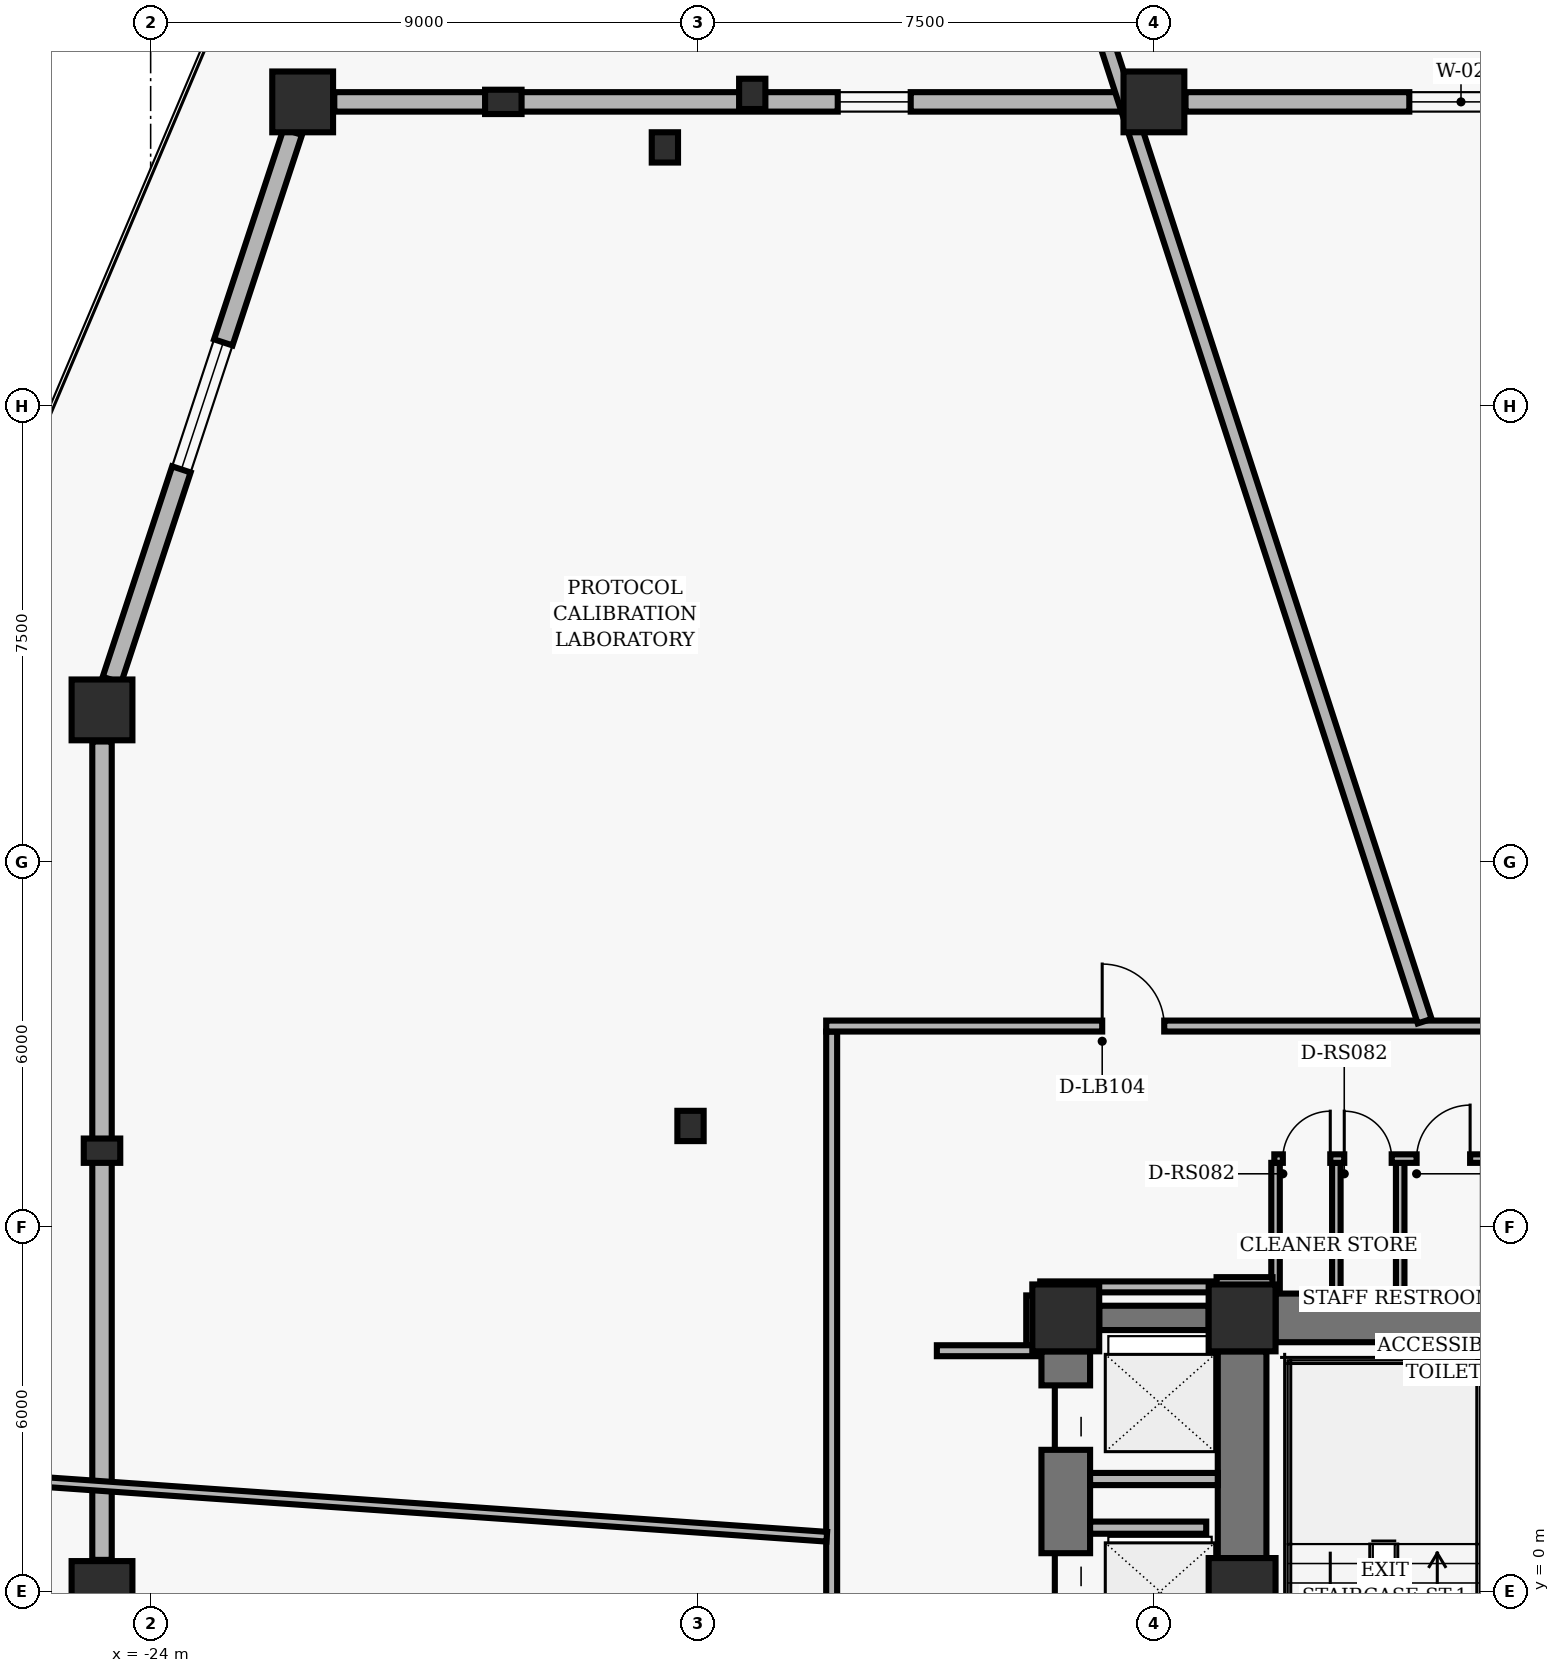
"""IFC4 building model, lengths in metres.
Left out: names, types, materials, properties, quantities, classifications, styles, units other than length and angle.
Written with IfcOpenShell. Run it as: python <this file> out.ifc"""

import sys

from ifc_helpers import new_model, si_unit, direction, frame, frame_2d, origin, origin_2d, place, context, subcontext, project, spatial, rectangle, hollow_rectangle, i_section, extrude, element, fill, save


model = new_model("IFC4")
c1 = context("Model", 3, precision=1e-05, world=origin(), true_north=direction((0.0, 1.0)))
c2 = subcontext(c1, "Body", "Model", "MODEL_VIEW")
j1 = project(units=[si_unit("LENGTHUNIT", "METRE"), si_unit("PLANEANGLEUNIT", "RADIAN")], contexts=[c1])
p1 = place(None, origin())
s1 = spatial("IfcSite", under=j1, at=p1, CompositionType="ELEMENT")
p2 = place(p1, origin())
s2 = spatial("IfcBuilding", under=s1, at=p2, CompositionType="ELEMENT")
p3 = place(p2, frame((0.0, 0.0, 8.32)))
s3 = spatial("IfcBuildingStorey", under=s2, at=p3, CompositionType="ELEMENT", Elevation=8.32)
for number, where, z_axis, x_axis in (
    (1, (-6.05, 4.5, 0.0), (0.0, 0.0, 1.0), (1.0, 0.0, 0.0)),
    (2, (-6.05, 0.0, 0.0), (0.0, 0.0, 1.0), (1.0, 0.0, 0.0)),
    (3, (-8.95, 4.5, 0.0), (0.0, 0.0, 1.0), (1.0, 0.0, 0.0)),
):
    element("IfcColumn", number, at=place(p3, frame(where, z_axis=z_axis, x_axis=x_axis)), inside=s3, PredefinedType="COLUMN", context=c2, shape_type="SweptSolid", body=[
        extrude(hollow_rectangle(XDim=1.1, YDim=1.1, WallThickness=0.07, InnerFilletRadius=0.02, OuterFilletRadius=0.04, at=origin_2d()), origin(), (0.0, 0.0, 1.0), 3.52),
    ])
p4 = place(p3, frame((-6.05, 0.55, 0.0), z_axis=(0.0, 0.0, 1.0), x_axis=(0.0, 1.0, 0.0)))
e4 = element("IfcWall", 4, at=p4, inside=s3, PredefinedType="SHEAR", context=c2, shape_type="SweptSolid", body=[
    extrude(rectangle(XDim=3.4, YDim=0.8, at=frame_2d((1.7, 0.0))), origin(), (0.0, 0.0, 1.0), 3.218),
])
p5 = place(p3, frame((-5.5, 4.5, 0.0), z_axis=(0.0, 0.0, 1.0), x_axis=(1.0, 0.0, 0.0)))
e5 = element("IfcWall", 5, at=p5, inside=s3, PredefinedType="SHEAR", context=c2, shape_type="SweptSolid", body=[
    extrude(rectangle(XDim=3.45, YDim=0.8, at=frame_2d((1.725, 0.0))), origin(), (0.0, 0.0, 1.0), 3.218),
])
p6 = place(p3, frame((-8.95, -3.75, 0.0), z_axis=(0.0, 0.0, 1.0), x_axis=(0.0, 1.0, 0.0)))
e6 = element("IfcWall", 6, at=p6, inside=s3, PredefinedType="SHEAR", context=c2, shape_type="SweptSolid", body=[
    extrude(rectangle(XDim=7.7, YDim=0.8, at=frame_2d((3.85, 0.0))), origin(), (0.0, 0.0, 1.0), 3.218),
])
p7 = place(p6, frame((0.55, 0.0, 0.0)))
e7 = element("IfcOpeningElement", 7, at=p7, cuts=e6, PredefinedType="OPENING", context=c2, shape_type="SweptSolid", body=[
    extrude(rectangle(XDim=1.06, YDim=2.04, at=frame_2d((0.53, 1.02))), frame((0.0, 0.41, 0.0), z_axis=(0.0, -1.0, 0.0), x_axis=(1.0, 0.0, 0.0)), (0.0, 0.0, 1.0), 0.82),
])
p8 = place(p6, frame((3.32, 0.0, 0.0)))
e8 = element("IfcOpeningElement", 8, at=p8, cuts=e6, PredefinedType="OPENING", context=c2, shape_type="SweptSolid", body=[
    extrude(rectangle(XDim=1.06, YDim=2.04, at=frame_2d((0.53, 1.02))), frame((0.0, 0.41, 0.0), z_axis=(0.0, -1.0, 0.0), x_axis=(1.0, 0.0, 0.0)), (0.0, 0.0, 1.0), 0.82),
])
p9 = place(p6, frame((6.08, 0.0, 0.0)))
e9 = element("IfcOpeningElement", 9, at=p9, cuts=e6, PredefinedType="OPENING", context=c2, shape_type="SweptSolid", body=[
    extrude(rectangle(XDim=1.06, YDim=2.04, at=frame_2d((0.53, 1.02))), frame((0.0, 0.41, 0.0), z_axis=(0.0, -1.0, 0.0), x_axis=(1.0, 0.0, 0.0)), (0.0, 0.0, 1.0), 0.82),
])
p10 = place(p3, frame((-8.4, 4.5, 0.0), z_axis=(0.0, 0.0, 1.0), x_axis=(1.0, 0.0, 0.0)))
e10 = element("IfcWall", 10, at=p10, inside=s3, PredefinedType="SHEAR", context=c2, shape_type="SweptSolid", body=[
    extrude(rectangle(XDim=1.8, YDim=0.4, at=frame_2d((0.9, 0.0))), origin(), (0.0, 0.0, 1.0), 3.218),
])
for number, where, z_axis, x_axis in (
    (11, (-7.5, 24.5, 0.0), (0.0, 0.0, 1.0), (1.0, 0.0, 0.0)),
    (12, (-21.5, 24.5, 0.0), (0.0, 0.0, 1.0), (1.0, 0.0, 0.0)),
    (13, (-24.8, 14.5, 0.0), (0.0, 0.0, 1.0), (1.0, 0.0, 0.0)),
    (14, (-24.8, 0.0, 0.0), (0.0, 0.0, 1.0), (1.0, 0.0, 0.0)),
):
    element("IfcColumn", number, at=place(p3, frame(where, z_axis=z_axis, x_axis=x_axis)), inside=s3, PredefinedType="COLUMN", context=c2, shape_type="SweptSolid", body=[
        extrude(rectangle(XDim=1.0, YDim=1.0, at=origin_2d()), origin(), (0.0, 0.0, 1.0), 3.52),
    ])
for number, where, z_axis, x_axis in (
    (15, (-14.106, 24.632, 0.0), (0.0, 0.0, 1.0), (1.0, 0.0, 0.0)),
    (16, (-15.543, 23.751, 0.0), (0.0, 0.0, 1.0), (1.0, 0.0, 0.0)),
    (17, (-15.121, 7.657, 0.0), (0.0, 0.0, 1.0), (1.0, 0.0, 0.0)),
):
    element("IfcColumn", number, at=place(p3, frame(where, z_axis=z_axis, x_axis=x_axis)), inside=s3, PredefinedType="COLUMN", context=c2, shape_type="SweptSolid", body=[
        extrude(i_section(OverallWidth=0.432, OverallDepth=0.498, WebThickness=0.056, FlangeThickness=0.089, FilletRadius=0.025, at=origin_2d()), origin(), (0.0, 0.0, 1.0), 3.52),
    ])
for number, where, z_axis, x_axis in (
    (18, (-18.2, 24.5, 0.0), (0.0, 0.0, 1.0), (1.0, 0.0, 0.0)),
    (19, (-24.8, 7.25, 0.0), (0.0, 0.0, 1.0), (1.0, 0.0, 0.0)),
):
    element("IfcColumn", number, at=place(p3, frame(where, z_axis=z_axis, x_axis=x_axis)), inside=s3, PredefinedType="PILASTER", context=c2, shape_type="SweptSolid", body=[
        extrude(rectangle(XDim=0.6, YDim=0.4, at=origin_2d()), origin(), (0.0, 0.0, 1.0), 3.52),
    ])
p11 = place(p3, frame((-6.98, 24.5, 0.0), z_axis=(0.0, 0.0, 1.0), x_axis=(1.0, 0.0, 0.0)))
e20 = element("IfcWall", 20, at=p11, inside=s3, PredefinedType="SOLIDWALL", context=c2, shape_type="SweptSolid", body=[
    extrude(rectangle(XDim=11.96, YDim=0.32, at=frame_2d((5.98, 0.0))), origin(), (0.0, 0.0, 1.0), 2.588),
])
p12 = place(p11, frame((3.68, 0.0, 0.65)))
e21 = element("IfcOpeningElement", 21, at=p12, cuts=e20, PredefinedType="OPENING", context=c2, shape_type="SweptSolid", body=[
    extrude(rectangle(XDim=1.7, YDim=1.5, at=frame_2d((0.85, 0.75))), frame((0.0, 0.17, 0.0), z_axis=(0.0, -1.0, 0.0), x_axis=(1.0, 0.0, 0.0)), (0.0, 0.0, 1.0), 0.34),
])
p13 = place(p11, frame((6.58, 0.0, 0.65)))
e22 = element("IfcOpeningElement", 22, at=p13, cuts=e20, PredefinedType="OPENING", context=c2, shape_type="SweptSolid", body=[
    extrude(rectangle(XDim=1.7, YDim=1.5, at=frame_2d((0.85, 0.75))), frame((0.0, 0.17, 0.0), z_axis=(0.0, -1.0, 0.0), x_axis=(1.0, 0.0, 0.0)), (0.0, 0.0, 1.0), 0.34),
])
p14 = place(p3, frame((-20.98, 24.5, 0.0), z_axis=(0.0, 0.0, 1.0), x_axis=(1.0, 0.0, 0.0)))
e23 = element("IfcWall", 23, at=p14, inside=s3, PredefinedType="SOLIDWALL", context=c2, shape_type="SweptSolid", body=[
    extrude(rectangle(XDim=12.96, YDim=0.32, at=frame_2d((6.48, 0.0))), origin(), (0.0, 0.0, 1.0), 2.588),
])
p15 = place(p14, frame((8.28, 0.0, 0.65)))
e24 = element("IfcOpeningElement", 24, at=p15, cuts=e23, PredefinedType="OPENING", context=c2, shape_type="SweptSolid", body=[
    extrude(rectangle(XDim=1.2, YDim=1.6, at=frame_2d((0.6, 0.8))), frame((0.0, 0.17, 0.0), z_axis=(0.0, -1.0, 0.0), x_axis=(1.0, 0.0, 0.0)), (0.0, 0.0, 1.0), 0.34),
])
p16 = place(p3, frame((-24.637, 14.994, 0.0), z_axis=(0.0, 0.0, 1.0), x_axis=(0.313363070681, 0.949633395544, 0.0)))
e25 = element("IfcWall", 25, at=p16, inside=s3, PredefinedType="SOLIDWALL", context=c2, shape_type="SweptSolid", body=[
    extrude(rectangle(XDim=9.49, YDim=0.32, at=frame_2d((4.745, 0.0))), origin(), (0.0, 0.0, 1.0), 2.588),
])
p17 = place(p16, frame((3.645, 0.0, 0.65)))
e26 = element("IfcOpeningElement", 26, at=p17, cuts=e25, PredefinedType="OPENING", context=c2, shape_type="SweptSolid", body=[
    extrude(rectangle(XDim=2.2, YDim=1.1, at=frame_2d((1.1, 0.55))), frame((0.0, 0.17, 0.0), z_axis=(0.0, -1.0, 0.0), x_axis=(1.0, 0.0, 0.0)), (0.0, 0.0, 1.0), 0.34),
])
p18 = place(p3, frame((-24.8, 0.52, 0.0), z_axis=(0.0, 0.0, 1.0), x_axis=(0.0, 1.0, 0.0)))
e27 = element("IfcWall", 27, at=p18, inside=s3, PredefinedType="SOLIDWALL", context=c2, shape_type="SweptSolid", body=[
    extrude(rectangle(XDim=13.46, YDim=0.32, at=frame_2d((6.73, 0.0))), origin(), (0.0, 0.0, 1.0), 2.261),
])
for number, where, z_axis, x_axis in (
    (28, (-5.5, 4.95, 0.0), (0.0, 0.0, 1.0), (0.0, 1.0, 0.0)),
    (29, (-4.5, 4.95, 0.0), (0.0, 0.0, 1.0), (0.0, 1.0, 0.0)),
    (30, (-3.45, 4.95, 0.0), (0.0, 0.0, 1.0), (0.0, 1.0, 0.0)),
):
    element("IfcWall", number, at=place(p3, frame(where, z_axis=z_axis, x_axis=x_axis)), inside=s3, PredefinedType="PARTITIONING", context=c2, shape_type="SweptSolid", body=[
        extrude(rectangle(XDim=2.1, YDim=0.14, at=frame_2d((1.05, 0.0))), origin(), (0.0, 0.0, 1.0), 3.193),
    ])
p19 = place(p3, frame((-5.52, 7.12, 0.0), z_axis=(0.0, 0.0, 1.0), x_axis=(1.0, 0.0, 0.0)))
e31 = element("IfcWall", 31, at=p19, inside=s3, PredefinedType="PARTITIONING", context=c2, shape_type="SweptSolid", body=[
    extrude(rectangle(XDim=3.52, YDim=0.14, at=frame_2d((1.76, 0.0))), origin(), (0.0, 0.0, 1.0), 3.193),
])
p20 = place(p19, frame((0.14, 0.0, 0.0)))
e32 = element("IfcOpeningElement", 32, at=p20, cuts=e31, PredefinedType="OPENING", context=c2, shape_type="SweptSolid", body=[
    extrude(rectangle(XDim=0.78, YDim=2.01, at=frame_2d((0.39, 1.005))), frame((0.0, 0.08, 0.0), z_axis=(0.0, -1.0, 0.0), x_axis=(1.0, 0.0, 0.0)), (0.0, 0.0, 1.0), 0.16),
])
p21 = place(p19, frame((1.15, 0.0, 0.0)))
e33 = element("IfcOpeningElement", 33, at=p21, cuts=e31, PredefinedType="OPENING", context=c2, shape_type="SweptSolid", body=[
    extrude(rectangle(XDim=0.78, YDim=2.01, at=frame_2d((0.39, 1.005))), frame((0.0, 0.08, 0.0), z_axis=(0.0, -1.0, 0.0), x_axis=(1.0, 0.0, 0.0)), (0.0, 0.0, 1.0), 0.16),
])
p22 = place(p19, frame((2.34, 0.0, 0.0)))
e34 = element("IfcOpeningElement", 34, at=p22, cuts=e31, PredefinedType="OPENING", context=c2, shape_type="SweptSolid", body=[
    extrude(rectangle(XDim=0.88, YDim=2.02, at=frame_2d((0.44, 1.01))), frame((0.0, 0.08, 0.0), z_axis=(0.0, -1.0, 0.0), x_axis=(1.0, 0.0, 0.0)), (0.0, 0.0, 1.0), 0.16),
])
p23 = place(p3, frame((-8.55, 1.85, 0.0), z_axis=(0.0, 0.0, 1.0), x_axis=(1.0, 0.0, 0.0)))
e35 = element("IfcWall", 35, at=p23, inside=s3, PredefinedType="PARTITIONING", context=c2, shape_type="SweptSolid", body=[
    extrude(rectangle(XDim=2.1, YDim=0.2, at=frame_2d((1.05, 0.0))), origin(), (0.0, 0.0, 1.0), 3.193),
])
p24 = place(p3, frame((-8.55, 1.05, 0.0), z_axis=(0.0, 0.0, 1.0), x_axis=(1.0, 0.0, 0.0)))
e36 = element("IfcWall", 36, at=p24, inside=s3, PredefinedType="PARTITIONING", context=c2, shape_type="SweptSolid", body=[
    extrude(rectangle(XDim=1.91, YDim=0.2, at=frame_2d((0.955, 0.0))), origin(), (0.0, 0.0, 1.0), 3.193),
])
p25 = place(p3, frame((-12.8, -3.61, 0.0), z_axis=(0.0, 0.0, 1.0), x_axis=(0.0, 1.0, 0.0)))
e37 = element("IfcWall", 37, at=p25, inside=s3, PredefinedType="PARTITIONING", context=c2, shape_type="SweptSolid", body=[
    extrude(rectangle(XDim=12.82, YDim=0.18, at=frame_2d((6.41, 0.0))), origin(), (0.0, 0.0, 1.0), 3.193),
])
p26 = place(p3, frame((-12.89, 9.3, 0.0), z_axis=(0.0, 0.0, 1.0), x_axis=(1.0, 0.0, 0.0)))
e38 = element("IfcWall", 38, at=p26, inside=s3, PredefinedType="PARTITIONING", context=c2, shape_type="SweptSolid", body=[
    extrude(rectangle(XDim=25.78, YDim=0.18, at=frame_2d((12.89, 0.0))), origin(), (0.0, 0.0, 1.0), 2.76),
])
p27 = place(p26, frame((17.202, 0.0, 0.0)))
e39 = element("IfcOpeningElement", 39, at=p27, cuts=e38, PredefinedType="OPENING", context=c2, shape_type="SweptSolid", body=[
    extrude(rectangle(XDim=0.96, YDim=2.02, at=frame_2d((0.48, 1.01))), frame((0.0, 0.1, 0.0), z_axis=(0.0, -1.0, 0.0), x_axis=(1.0, 0.0, 0.0)), (0.0, 0.0, 1.0), 0.2),
])
p28 = place(p26, frame((4.539, 0.0, 0.0)))
e40 = element("IfcOpeningElement", 40, at=p28, cuts=e38, PredefinedType="OPENING", context=c2, shape_type="SweptSolid", body=[
    extrude(rectangle(XDim=1.02, YDim=2.02, at=frame_2d((0.51, 1.01))), frame((0.0, 0.1, 0.0), z_axis=(0.0, -1.0, 0.0), x_axis=(1.0, 0.0, 0.0)), (0.0, 0.0, 1.0), 0.2),
])
p29 = place(p3, frame((-5.55, 5.08, 0.0), z_axis=(0.0, 0.0, 1.0), x_axis=(-1.0, 0.0, 0.0)))
e41 = element("IfcWall", 41, at=p29, inside=s3, PredefinedType="PARTITIONING", context=c2, shape_type="SweptSolid", body=[
    extrude(rectangle(XDim=0.92, YDim=0.18, at=frame_2d((0.46, 0.0))), origin(), (0.0, 0.0, 1.0), 3.193),
])
p30 = place(p3, frame((-6.562, 5.01, 0.0), z_axis=(0.0, 0.0, 1.0), x_axis=(-1.0, 0.0, 0.0)))
e42 = element("IfcWall", 42, at=p30, inside=s3, PredefinedType="PARTITIONING", context=c2, shape_type="SweptSolid", body=[
    extrude(rectangle(XDim=2.808, YDim=0.18, at=frame_2d((1.404, 0.0))), origin(), (0.0, 0.0, 1.0), 3.193),
])
p31 = place(p3, frame((-9.51, 4.87, 0.0), z_axis=(0.0, 0.0, 1.0), x_axis=(0.0, -1.0, 0.0)))
e43 = element("IfcWall", 43, at=p31, inside=s3, PredefinedType="PARTITIONING", context=c2, shape_type="SweptSolid", body=[
    extrude(rectangle(XDim=0.82, YDim=0.18, at=frame_2d((0.41, 0.0))), origin(), (0.0, 0.0, 1.0), 3.193),
])
p32 = place(p3, frame((-9.42, 3.96, 0.0), z_axis=(0.0, 0.0, 1.0), x_axis=(-1.0, 0.0, 0.0)))
e44 = element("IfcWall", 44, at=p32, inside=s3, PredefinedType="PARTITIONING", context=c2, shape_type="SweptSolid", body=[
    extrude(rectangle(XDim=1.65, YDim=0.18, at=frame_2d((0.825, 0.0))), origin(), (0.0, 0.0, 1.0), 3.193),
])
p33 = place(p3, frame((-3.048, 9.38, 0.0), z_axis=(0.0, 0.0, 1.0), x_axis=(-0.309026872476, 0.951053306649, 0.0)))
e45 = element("IfcWall", 45, at=p33, inside=s3, PredefinedType="PARTITIONING", context=c2, shape_type="SweptSolid", body=[
    extrude(rectangle(XDim=18.464, YDim=0.24, at=frame_2d((9.232, 0.0))), origin(), (0.0, 0.0, 1.0), 2.246),
])
p34 = place(p3, frame((-12.88, 0.901, 0.0), z_axis=(0.0, 0.0, 1.0), x_axis=(-0.99756431173, 0.069752734445, 0.0)))
e46 = element("IfcWall", 46, at=p34, inside=s3, PredefinedType="PARTITIONING", context=c2, shape_type="SweptSolid", body=[
    extrude(rectangle(XDim=13.643, YDim=0.16, at=frame_2d((6.822, 0.0))), origin(), (0.0, 0.0, 1.0), 3.193),
])
p35 = place(p12, origin())
e47 = element("IfcWindow", 47, at=p35, inside=s3, PartitioningType="SINGLE_PANEL", PredefinedType="WINDOW", context=c2, shape_type="SweptSolid", body=[
    extrude(rectangle(XDim=1.7, YDim=1.5, at=frame_2d((0.85, 0.75))), frame((0.0, 0.03, 0.0), z_axis=(0.0, -1.0, 0.0), x_axis=(1.0, 0.0, 0.0)), (0.0, 0.0, 1.0), 0.06),
])
fill(e21, e47)
p36 = place(p15, origin())
e48 = element("IfcWindow", 48, at=p36, inside=s3, PartitioningType="SINGLE_PANEL", PredefinedType="WINDOW", context=c2, shape_type="SweptSolid", body=[
    extrude(rectangle(XDim=1.2, YDim=1.6, at=frame_2d((0.6, 0.8))), frame((0.0, 0.03, 0.0), z_axis=(0.0, -1.0, 0.0), x_axis=(1.0, 0.0, 0.0)), (0.0, 0.0, 1.0), 0.06),
])
fill(e24, e48)
p37 = place(p17, origin())
e49 = element("IfcWindow", 49, at=p37, inside=s3, PartitioningType="SINGLE_PANEL", PredefinedType="WINDOW", context=c2, shape_type="SweptSolid", body=[
    extrude(rectangle(XDim=2.2, YDim=1.1, at=frame_2d((1.1, 0.55))), frame((0.0, 0.03, 0.0), z_axis=(0.0, -1.0, 0.0), x_axis=(1.0, 0.0, 0.0)), (0.0, 0.0, 1.0), 0.06),
])
fill(e26, e49)
p38 = place(p20, origin())
e50 = element("IfcDoor", 50, at=p38, inside=s3, OperationType="SINGLE_SWING_RIGHT", PredefinedType="DOOR", context=c2, shape_type="SweptSolid", body=[
    extrude(rectangle(XDim=0.78, YDim=2.01, at=frame_2d((0.39, 1.005))), frame((0.0, 0.025, 0.0), z_axis=(0.0, -1.0, 0.0), x_axis=(1.0, 0.0, 0.0)), (0.0, 0.0, 1.0), 0.05),
])
fill(e32, e50)
p39 = place(p21, origin())
e51 = element("IfcDoor", 51, at=p39, inside=s3, OperationType="SINGLE_SWING_LEFT", PredefinedType="DOOR", context=c2, shape_type="SweptSolid", body=[
    extrude(rectangle(XDim=0.78, YDim=2.01, at=frame_2d((0.39, 1.005))), frame((0.0, 0.025, 0.0), z_axis=(0.0, -1.0, 0.0), x_axis=(1.0, 0.0, 0.0)), (0.0, 0.0, 1.0), 0.05),
])
fill(e33, e51)
p40 = place(p22, origin())
e52 = element("IfcDoor", 52, at=p40, inside=s3, OperationType="SINGLE_SWING_RIGHT", PredefinedType="DOOR", context=c2, shape_type="SweptSolid", body=[
    extrude(rectangle(XDim=0.88, YDim=2.02, at=frame_2d((0.44, 1.01))), frame((0.0, 0.025, 0.0), z_axis=(0.0, -1.0, 0.0), x_axis=(1.0, 0.0, 0.0)), (0.0, 0.0, 1.0), 0.05),
])
fill(e34, e52)
p41 = place(p8, origin())
e53 = element("IfcDoor", 53, at=p41, inside=s3, OperationType="SLIDING_TO_RIGHT", PredefinedType="DOOR", context=c2, shape_type="SweptSolid", body=[
    extrude(rectangle(XDim=1.06, YDim=2.04, at=frame_2d((0.53, 1.02))), frame((0.0, 0.025, 0.0), z_axis=(0.0, -1.0, 0.0), x_axis=(1.0, 0.0, 0.0)), (0.0, 0.0, 1.0), 0.05),
])
fill(e8, e53)
p42 = place(p9, origin())
e54 = element("IfcDoor", 54, at=p42, inside=s3, OperationType="SLIDING_TO_LEFT", PredefinedType="DOOR", context=c2, shape_type="SweptSolid", body=[
    extrude(rectangle(XDim=1.06, YDim=2.04, at=frame_2d((0.53, 1.02))), frame((0.0, 0.025, 0.0), z_axis=(0.0, -1.0, 0.0), x_axis=(1.0, 0.0, 0.0)), (0.0, 0.0, 1.0), 0.05),
])
fill(e9, e54)
p43 = place(p28, origin())
e55 = element("IfcDoor", 55, at=p43, inside=s3, OperationType="SINGLE_SWING_LEFT", PredefinedType="DOOR", context=c2, shape_type="SweptSolid", body=[
    extrude(rectangle(XDim=1.02, YDim=2.02, at=frame_2d((0.51, 1.01))), frame((0.0, 0.025, 0.0), z_axis=(0.0, -1.0, 0.0), x_axis=(1.0, 0.0, 0.0)), (0.0, 0.0, 1.0), 0.05),
])
fill(e40, e55)
save(model, sys.argv[1])
